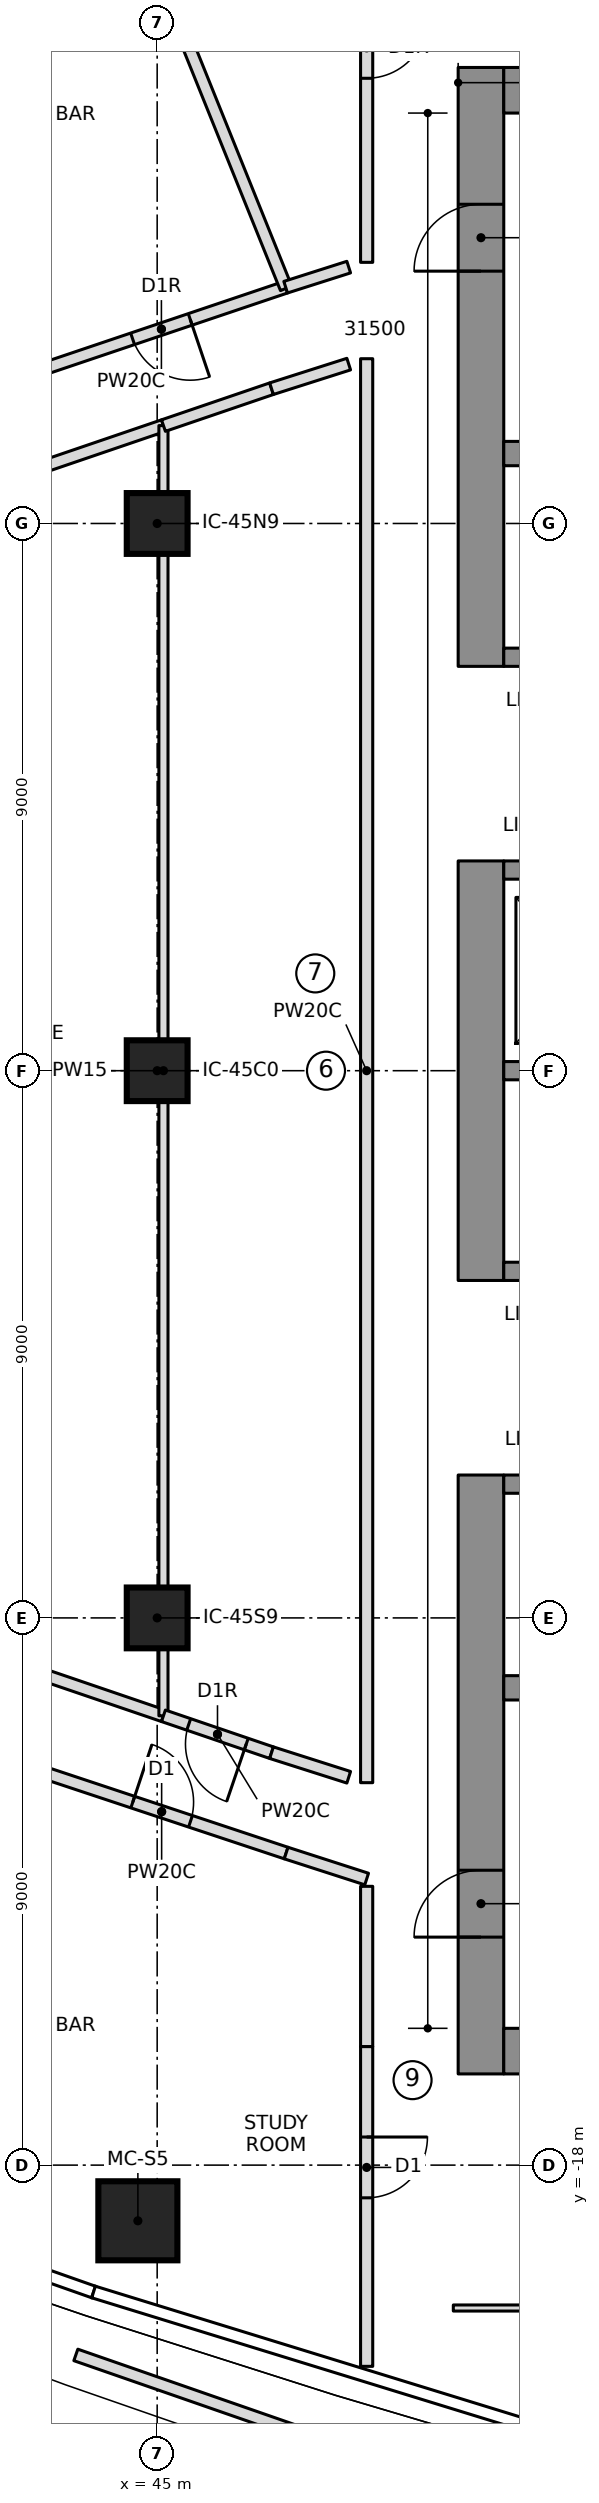
"""IFC4 building model, lengths in metres.
Left out: names, types, materials, properties, quantities, classifications, styles, units other than length and angle.
Written with IfcOpenShell. Run it as: python <this file> out.ifc"""

import sys

from ifc_helpers import new_model, si_unit, direction, frame, frame_2d, origin, origin_2d, place, context, subcontext, project, spatial, rectangle, extrude, element, fill, save


model = new_model("IFC4")
c1 = context("Model", 3, precision=1e-05, world=origin(), true_north=direction((0.0, 1.0)))
c2 = subcontext(c1, "Body", "Model", "MODEL_VIEW")
j1 = project(units=[si_unit("LENGTHUNIT", "METRE"), si_unit("PLANEANGLEUNIT", "RADIAN")], contexts=[c1])
p1 = place(None, origin())
s1 = spatial("IfcSite", under=j1, at=p1, CompositionType="ELEMENT")
p2 = place(p1, origin())
s2 = spatial("IfcBuilding", under=s1, at=p2, CompositionType="ELEMENT")
p3 = place(p2, frame((0.0, 0.0, 170.9)))
s3 = spatial("IfcBuildingStorey", under=s2, at=p3, CompositionType="ELEMENT", Elevation=170.9)
p4 = place(p3, frame((50.325, 6.65, 0.0), z_axis=(0.0, 0.0, 1.0), x_axis=(0.0, 1.0, 0.0)))
e1 = element("IfcWall", 1, at=p4, inside=s3, PredefinedType="SHEAR", context=c2, shape_type="SweptSolid", body=[
    extrude(rectangle(XDim=9.85, YDim=0.75, at=frame_2d((4.925, 0.0))), origin(), (0.0, 0.0, 1.0), 4.6),
])
p5 = place(p4, frame((6.5, 0.0, 0.0)))
e2 = element("IfcOpeningElement", 2, at=p5, cuts=e1, PredefinedType="OPENING", context=c2, shape_type="SweptSolid", body=[
    extrude(rectangle(XDim=1.1, YDim=2.1, at=frame_2d((0.55, 1.05))), frame((0.0, 0.385, 0.0), z_axis=(0.0, -1.0, 0.0), x_axis=(1.0, 0.0, 0.0)), (0.0, 0.0, 1.0), 0.77),
])
p6 = place(p3, frame((50.325, -3.45, 0.0), z_axis=(0.0, 0.0, 1.0), x_axis=(0.0, 1.0, 0.0)))
e3 = element("IfcWall", 3, at=p6, inside=s3, PredefinedType="SHEAR", context=c2, shape_type="SweptSolid", body=[
    extrude(rectangle(XDim=6.9, YDim=0.75, at=frame_2d((3.45, 0.0))), origin(), (0.0, 0.0, 1.0), 4.6),
])
p7 = place(p3, frame((50.325, -16.5, 0.0), z_axis=(0.0, 0.0, 1.0), x_axis=(0.0, 1.0, 0.0)))
e4 = element("IfcWall", 4, at=p7, inside=s3, PredefinedType="SHEAR", context=c2, shape_type="SweptSolid", body=[
    extrude(rectangle(XDim=9.85, YDim=0.75, at=frame_2d((4.925, 0.0))), origin(), (0.0, 0.0, 1.0), 4.6),
])
p8 = place(p7, frame((2.25, 0.0, 0.0)))
e5 = element("IfcOpeningElement", 5, at=p8, cuts=e4, PredefinedType="OPENING", context=c2, shape_type="SweptSolid", body=[
    extrude(rectangle(XDim=1.1, YDim=2.1, at=frame_2d((0.55, 1.05))), frame((0.0, 0.385, 0.0), z_axis=(0.0, -1.0, 0.0), x_axis=(1.0, 0.0, 0.0)), (0.0, 0.0, 1.0), 0.77),
])
for number, where, z_axis, x_axis in (
    (6, (50.7, 16.125, 0.0), (0.0, 0.0, 1.0), (1.0, 0.0, 0.0)),
    (7, (50.7, -16.125, 0.0), (0.0, 0.0, 1.0), (1.0, 0.0, 0.0)),
):
    element("IfcWall", number, at=place(p3, frame(where, z_axis=z_axis, x_axis=x_axis)), inside=s3, PredefinedType="SHEAR", context=c2, shape_type="SweptSolid", body=[
        extrude(rectangle(XDim=13.77, YDim=0.75, at=frame_2d((6.885, 0.0))), origin(), (0.0, 0.0, 1.0), 4.6),
    ])
p9 = place(p3, frame((50.7, 10.15, 0.0), z_axis=(0.0, 0.0, 1.0), x_axis=(1.0, 0.0, 0.0)))
e8 = element("IfcWall", 8, at=p9, inside=s3, PredefinedType="SHEAR", context=c2, shape_type="SweptSolid", body=[
    extrude(rectangle(XDim=13.02, YDim=0.4, at=frame_2d((6.51, 0.0))), origin(), (0.0, 0.0, 1.0), 4.6),
])
p10 = place(p9, frame((0.7, 0.0, 0.0)))
e9 = element("IfcOpeningElement", 9, at=p10, cuts=e8, PredefinedType="OPENING", context=c2, shape_type="SweptSolid", body=[
    extrude(rectangle(XDim=1.1, YDim=2.1, at=frame_2d((0.55, 1.05))), frame((0.0, 0.21, 0.0), z_axis=(0.0, -1.0, 0.0), x_axis=(1.0, 0.0, 0.0)), (0.0, 0.0, 1.0), 0.42),
])
p11 = place(p9, frame((3.5, 0.0, 0.0)))
e10 = element("IfcOpeningElement", 10, at=p11, cuts=e8, PredefinedType="OPENING", context=c2, shape_type="SweptSolid", body=[
    extrude(rectangle(XDim=1.1, YDim=2.1, at=frame_2d((0.55, 1.05))), frame((0.0, 0.21, 0.0), z_axis=(0.0, -1.0, 0.0), x_axis=(1.0, 0.0, 0.0)), (0.0, 0.0, 1.0), 0.42),
])
p12 = place(p3, frame((50.7, -10.15, 0.0), z_axis=(0.0, 0.0, 1.0), x_axis=(1.0, 0.0, 0.0)))
e11 = element("IfcWall", 11, at=p12, inside=s3, PredefinedType="SHEAR", context=c2, shape_type="SweptSolid", body=[
    extrude(rectangle(XDim=13.02, YDim=0.4, at=frame_2d((6.51, 0.0))), origin(), (0.0, 0.0, 1.0), 4.6),
])
p13 = place(p3, frame((50.7, 0.0, 0.0), z_axis=(0.0, 0.0, 1.0), x_axis=(1.0, 0.0, 0.0)))
e12 = element("IfcWall", 12, at=p13, inside=s3, PredefinedType="SHEAR", context=c2, shape_type="SweptSolid", body=[
    extrude(rectangle(XDim=10.9, YDim=0.3, at=frame_2d((5.45, 0.0))), origin(), (0.0, 0.0, 1.0), 4.6),
])
p14 = place(p3, frame((50.7, 3.3, 0.0), z_axis=(0.0, 0.0, 1.0), x_axis=(1.0, 0.0, 0.0)))
e13 = element("IfcWall", 13, at=p14, inside=s3, PredefinedType="SHEAR", context=c2, shape_type="SweptSolid", body=[
    extrude(rectangle(XDim=10.9, YDim=0.3, at=frame_2d((5.45, 0.0))), origin(), (0.0, 0.0, 1.0), 4.6),
])
p15 = place(p14, frame((0.7, 0.0, 0.0)))
e14 = element("IfcOpeningElement", 14, at=p15, cuts=e13, PredefinedType="OPENING", context=c2, shape_type="SweptSolid", body=[
    extrude(rectangle(XDim=1.1, YDim=2.1, at=frame_2d((0.55, 1.05))), frame((0.0, 0.16, 0.0), z_axis=(0.0, -1.0, 0.0), x_axis=(1.0, 0.0, 0.0)), (0.0, 0.0, 1.0), 0.32),
])
p16 = place(p14, frame((3.5, 0.0, 0.0)))
e15 = element("IfcOpeningElement", 15, at=p16, cuts=e13, PredefinedType="OPENING", context=c2, shape_type="SweptSolid", body=[
    extrude(rectangle(XDim=1.1, YDim=2.1, at=frame_2d((0.55, 1.05))), frame((0.0, 0.16, 0.0), z_axis=(0.0, -1.0, 0.0), x_axis=(1.0, 0.0, 0.0)), (0.0, 0.0, 1.0), 0.32),
])
p17 = place(p14, frame((6.3, 0.0, 0.0)))
e16 = element("IfcOpeningElement", 16, at=p17, cuts=e13, PredefinedType="OPENING", context=c2, shape_type="SweptSolid", body=[
    extrude(rectangle(XDim=1.1, YDim=2.1, at=frame_2d((0.55, 1.05))), frame((0.0, 0.16, 0.0), z_axis=(0.0, -1.0, 0.0), x_axis=(1.0, 0.0, 0.0)), (0.0, 0.0, 1.0), 0.32),
])
p18 = place(p14, frame((9.1, 0.0, 0.0)))
e17 = element("IfcOpeningElement", 17, at=p18, cuts=e13, PredefinedType="OPENING", context=c2, shape_type="SweptSolid", body=[
    extrude(rectangle(XDim=1.1, YDim=2.1, at=frame_2d((0.55, 1.05))), frame((0.0, 0.16, 0.0), z_axis=(0.0, -1.0, 0.0), x_axis=(1.0, 0.0, 0.0)), (0.0, 0.0, 1.0), 0.32),
])
p19 = place(p3, frame((50.7, 6.8, 0.0), z_axis=(0.0, 0.0, 1.0), x_axis=(1.0, 0.0, 0.0)))
e18 = element("IfcWall", 18, at=p19, inside=s3, PredefinedType="SHEAR", context=c2, shape_type="SweptSolid", body=[
    extrude(rectangle(XDim=10.9, YDim=0.3, at=frame_2d((5.45, 0.0))), origin(), (0.0, 0.0, 1.0), 4.6),
])
p20 = place(p19, frame((6.3, 0.0, 0.0)))
e19 = element("IfcOpeningElement", 19, at=p20, cuts=e18, PredefinedType="OPENING", context=c2, shape_type="SweptSolid", body=[
    extrude(rectangle(XDim=1.1, YDim=2.1, at=frame_2d((0.55, 1.05))), frame((0.0, 0.16, 0.0), z_axis=(0.0, -1.0, 0.0), x_axis=(1.0, 0.0, 0.0)), (0.0, 0.0, 1.0), 0.32),
])
p21 = place(p19, frame((9.1, 0.0, 0.0)))
e20 = element("IfcOpeningElement", 20, at=p21, cuts=e18, PredefinedType="OPENING", context=c2, shape_type="SweptSolid", body=[
    extrude(rectangle(XDim=1.1, YDim=2.1, at=frame_2d((0.55, 1.05))), frame((0.0, 0.16, 0.0), z_axis=(0.0, -1.0, 0.0), x_axis=(1.0, 0.0, 0.0)), (0.0, 0.0, 1.0), 0.32),
])
p22 = place(p3, frame((50.7, -3.3, 0.0), z_axis=(0.0, 0.0, 1.0), x_axis=(1.0, 0.0, 0.0)))
e21 = element("IfcWall", 21, at=p22, inside=s3, PredefinedType="SHEAR", context=c2, shape_type="SweptSolid", body=[
    extrude(rectangle(XDim=10.9, YDim=0.3, at=frame_2d((5.45, 0.0))), origin(), (0.0, 0.0, 1.0), 4.6),
])
p23 = place(p22, frame((9.1, 0.0, 0.0)))
e22 = element("IfcOpeningElement", 22, at=p23, cuts=e21, PredefinedType="OPENING", context=c2, shape_type="SweptSolid", body=[
    extrude(rectangle(XDim=1.1, YDim=2.1, at=frame_2d((0.55, 1.05))), frame((0.0, 0.16, 0.0), z_axis=(0.0, -1.0, 0.0), x_axis=(1.0, 0.0, 0.0)), (0.0, 0.0, 1.0), 0.32),
])
p24 = place(p3, frame((50.7, -6.8, 0.0), z_axis=(0.0, 0.0, 1.0), x_axis=(1.0, 0.0, 0.0)))
e23 = element("IfcWall", 23, at=p24, inside=s3, PredefinedType="SHEAR", context=c2, shape_type="SweptSolid", body=[
    extrude(rectangle(XDim=10.9, YDim=0.3, at=frame_2d((5.45, 0.0))), origin(), (0.0, 0.0, 1.0), 4.6),
])
p25 = place(p24, frame((0.7, 0.0, 0.0)))
e24 = element("IfcOpeningElement", 24, at=p25, cuts=e23, PredefinedType="OPENING", context=c2, shape_type="SweptSolid", body=[
    extrude(rectangle(XDim=1.1, YDim=2.1, at=frame_2d((0.55, 1.05))), frame((0.0, 0.16, 0.0), z_axis=(0.0, -1.0, 0.0), x_axis=(1.0, 0.0, 0.0)), (0.0, 0.0, 1.0), 0.32),
])
p26 = place(p24, frame((3.5, 0.0, 0.0)))
e25 = element("IfcOpeningElement", 25, at=p26, cuts=e23, PredefinedType="OPENING", context=c2, shape_type="SweptSolid", body=[
    extrude(rectangle(XDim=1.1, YDim=2.1, at=frame_2d((0.55, 1.05))), frame((0.0, 0.16, 0.0), z_axis=(0.0, -1.0, 0.0), x_axis=(1.0, 0.0, 0.0)), (0.0, 0.0, 1.0), 0.32),
])
p27 = place(p24, frame((6.3, 0.0, 0.0)))
e26 = element("IfcOpeningElement", 26, at=p27, cuts=e23, PredefinedType="OPENING", context=c2, shape_type="SweptSolid", body=[
    extrude(rectangle(XDim=1.1, YDim=2.1, at=frame_2d((0.55, 1.05))), frame((0.0, 0.16, 0.0), z_axis=(0.0, -1.0, 0.0), x_axis=(1.0, 0.0, 0.0)), (0.0, 0.0, 1.0), 0.32),
])
p28 = place(p24, frame((9.1, 0.0, 0.0)))
e27 = element("IfcOpeningElement", 27, at=p28, cuts=e23, PredefinedType="OPENING", context=c2, shape_type="SweptSolid", body=[
    extrude(rectangle(XDim=1.1, YDim=2.1, at=frame_2d((0.55, 1.05))), frame((0.0, 0.16, 0.0), z_axis=(0.0, -1.0, 0.0), x_axis=(1.0, 0.0, 0.0)), (0.0, 0.0, 1.0), 0.32),
])
p29 = place(p3, frame((44.683, -18.916, 0.0), z_axis=(0.0, 0.0, 1.0), x_axis=(1.0, 0.0, 0.0)))
e28 = element("IfcColumn", 28, at=p29, inside=s3, PredefinedType="COLUMN", context=c2, shape_type="SweptSolid", body=[
    extrude(rectangle(XDim=1.3, YDim=1.3, at=origin_2d()), origin(), (0.0, 0.0, 1.0), 4.6),
])
for number, where, z_axis, x_axis in (
    (29, (45.0, -9.0, 0.0), (0.0, 0.0, 1.0), (1.0, 0.0, 0.0)),
    (30, (45.0, 0.0, 0.0), (0.0, 0.0, 1.0), (1.0, 0.0, 0.0)),
    (31, (45.0, 9.0, 0.0), (0.0, 0.0, 1.0), (1.0, 0.0, 0.0)),
):
    element("IfcColumn", number, at=place(p3, frame(where, z_axis=z_axis, x_axis=x_axis)), inside=s3, PredefinedType="COLUMN", context=c2, shape_type="SweptSolid", body=[
        extrude(rectangle(XDim=1.0, YDim=1.0, at=origin_2d()), origin(), (0.0, 0.0, 1.0), 4.6),
    ])
p30 = place(p3, frame((43.662, -21.122, 0.0), z_axis=(0.0, 0.0, 1.0), x_axis=(0.944536635865, -0.328406064969, 0.0)))
e32 = element("IfcWall", 32, at=p30, inside=s3, PredefinedType="PARAPET", context=c2, shape_type="SweptSolid", body=[
    extrude(rectangle(XDim=4.381, YDim=0.2, at=frame_2d((2.19, 0.0))), origin(), (0.0, 0.0, 1.0), 1.1),
])
p31 = place(p3, frame((47.113, 12.886, 0.0), z_axis=(0.0, 0.0, 1.0), x_axis=(-0.947550995841, -0.319604615549, 0.0)))
e33 = element("IfcWall", 33, at=p31, inside=s3, PredefinedType="PARTITIONING", context=c2, shape_type="SweptSolid", body=[
    extrude(rectangle(XDim=4.314, YDim=0.2, at=frame_2d((2.157, 0.0))), origin(), (0.0, 0.0, 1.0), 4.3),
])
p32 = place(p31, frame((1.657, 0.0, 0.0)))
e34 = element("IfcOpeningElement", 34, at=p32, cuts=e33, PredefinedType="OPENING", context=c2, shape_type="SweptSolid", body=[
    extrude(rectangle(XDim=1.0, YDim=2.1, at=frame_2d((0.5, 1.05))), frame((0.0, 0.11, 0.0), z_axis=(0.0, -1.0, 0.0), x_axis=(1.0, 0.0, 0.0)), (0.0, 0.0, 1.0), 0.22),
])
p33 = place(p3, frame((47.121, 12.867, 0.0), z_axis=(0.0, 0.0, 1.0), x_axis=(-0.373907892596, 0.92746584188, 0.0)))
e35 = element("IfcWall", 35, at=p33, inside=s3, PredefinedType="PARTITIONING", context=c2, shape_type="SweptSolid", body=[
    extrude(rectangle(XDim=7.621, YDim=0.2, at=frame_2d((3.811, 0.0))), origin(), (0.0, 0.0, 1.0), 4.3),
])
p34 = place(p3, frame((43.026, -11.507, 0.0), z_axis=(0.0, 0.0, 1.0), x_axis=(0.949022233489, -0.315209137469, 0.0)))
e36 = element("IfcWall", 36, at=p34, inside=s3, PredefinedType="PARTITIONING", context=c2, shape_type="SweptSolid", body=[
    extrude(rectangle(XDim=4.315, YDim=0.2, at=frame_2d((2.157, 0.0))), origin(), (0.0, 0.0, 1.0), 4.3),
])
p35 = place(p34, frame((1.657, 0.0, 0.0)))
e37 = element("IfcOpeningElement", 37, at=p35, cuts=e36, PredefinedType="OPENING", context=c2, shape_type="SweptSolid", body=[
    extrude(rectangle(XDim=1.0, YDim=2.1, at=frame_2d((0.5, 1.05))), frame((0.0, 0.11, 0.0), z_axis=(0.0, -1.0, 0.0), x_axis=(1.0, 0.0, 0.0)), (0.0, 0.0, 1.0), 0.22),
])
for number, where, z_axis, x_axis in (
    (38, (42.984, 9.887, 0.0), (0.0, 0.0, 1.0), (0.946, 0.323, 0.0)),
    (39, (45.103, -10.61, 0.0), (0.0, 0.0, 1.0), (-0.946, 0.323, 0.0)),
):
    element("IfcWall", number, at=place(p3, frame(where, z_axis=z_axis, x_axis=x_axis)), inside=s3, PredefinedType="PARTITIONING", context=c2, shape_type="SweptSolid", body=[
        extrude(rectangle(XDim=2.239, YDim=0.2, at=frame_2d((1.119, 0.0))), origin(), (0.0, 0.0, 1.0), 4.3),
    ])
p36 = place(p3, frame((45.103, -10.61, 0.0), z_axis=(0.0, 0.0, 1.0), x_axis=(0.0, 1.0, 0.0)))
e40 = element("IfcWall", 40, at=p36, inside=s3, PredefinedType="PARTITIONING", context=c2, shape_type="SweptSolid", body=[
    extrude(rectangle(XDim=21.22, YDim=0.15, at=frame_2d((10.61, 0.0))), origin(), (0.0, 0.0, 1.0), 4.3),
])
p37 = place(p3, frame((46.881, -11.217, 0.0), z_axis=(0.0, 0.0, 1.0), x_axis=(-0.946437079914, 0.322888299204, 0.0)))
e41 = element("IfcWall", 41, at=p37, inside=s3, PredefinedType="PARTITIONING", context=c2, shape_type="SweptSolid", body=[
    extrude(rectangle(XDim=1.878, YDim=0.2, at=frame_2d((0.939, 0.0))), origin(), (0.0, 0.0, 1.0), 4.3),
])
p38 = place(p37, frame((0.439, 0.0, 0.0)))
e42 = element("IfcOpeningElement", 42, at=p38, cuts=e41, PredefinedType="OPENING", context=c2, shape_type="SweptSolid", body=[
    extrude(rectangle(XDim=1.0, YDim=2.1, at=frame_2d((0.5, 1.05))), frame((0.0, 0.11, 0.0), z_axis=(0.0, -1.0, 0.0), x_axis=(1.0, 0.0, 0.0)), (0.0, 0.0, 1.0), 0.22),
])
p39 = place(p3, frame((45.103, 10.61, 0.0), z_axis=(0.0, 0.0, 1.0), x_axis=(0.946437079914, 0.322888299204, 0.0)))
e43 = element("IfcWall", 43, at=p39, inside=s3, PredefinedType="PARTITIONING", context=c2, shape_type="SweptSolid", body=[
    extrude(rectangle(XDim=1.878, YDim=0.2, at=frame_2d((0.939, 0.0))), origin(), (0.0, 0.0, 1.0), 4.3),
])
p40 = place(p3, frame((48.15, 13.217, 0.0), z_axis=(0.0, 0.0, 1.0), x_axis=(-0.952731090451, -0.303814860215, 0.0)))
e44 = element("IfcWall", 44, at=p40, inside=s3, PredefinedType="PARTITIONING", context=c2, shape_type="SweptSolid", body=[
    extrude(rectangle(XDim=1.088, YDim=0.2, at=frame_2d((0.544, 0.0))), origin(), (0.0, 0.0, 1.0), 4.3),
])
for number, where, z_axis, x_axis in (
    (45, (46.881, 11.217, 0.0), (0.0, 0.0, 1.0), (0.953, 0.304, 0.0)),
    (46, (48.15, -11.621, 0.0), (0.0, 0.0, 1.0), (-0.953, 0.304, 0.0)),
):
    element("IfcWall", number, at=place(p3, frame(where, z_axis=z_axis, x_axis=x_axis)), inside=s3, PredefinedType="PARTITIONING", context=c2, shape_type="SweptSolid", body=[
        extrude(rectangle(XDim=1.332, YDim=0.2, at=frame_2d((0.666, 0.0))), origin(), (0.0, 0.0, 1.0), 4.3),
    ])
p41 = place(p3, frame((48.445, -16.05, 0.0), z_axis=(0.0, 0.0, 1.0), x_axis=(0.0, -1.0, 0.0)))
e47 = element("IfcWall", 47, at=p41, inside=s3, PredefinedType="PARTITIONING", context=c2, shape_type="SweptSolid", body=[
    extrude(rectangle(XDim=5.26, YDim=0.2, at=frame_2d((2.63, 0.0))), origin(), (0.0, 0.0, 1.0), 4.3),
])
p42 = place(p41, frame((1.488, 0.0, 0.0)))
e48 = element("IfcOpeningElement", 48, at=p42, cuts=e47, PredefinedType="OPENING", context=c2, shape_type="SweptSolid", body=[
    extrude(rectangle(XDim=1.0, YDim=2.1, at=frame_2d((0.5, 1.05))), frame((0.0, 0.11, 0.0), z_axis=(0.0, -1.0, 0.0), x_axis=(1.0, 0.0, 0.0)), (0.0, 0.0, 1.0), 0.22),
])
p43 = place(p3, frame((48.445, 11.71, 0.0), z_axis=(0.0, 0.0, 1.0), x_axis=(0.0, -1.0, 0.0)))
e49 = element("IfcWall", 49, at=p43, inside=s3, PredefinedType="PARTITIONING", context=c2, shape_type="SweptSolid", body=[
    extrude(rectangle(XDim=23.42, YDim=0.2, at=frame_2d((11.71, 0.0))), origin(), (0.0, 0.0, 1.0), 4.3),
])
p44 = place(p3, frame((48.445, 20.35, 0.0), z_axis=(0.0, 0.0, 1.0), x_axis=(0.0, -1.0, 0.0)))
e50 = element("IfcWall", 50, at=p44, inside=s3, PredefinedType="PARTITIONING", context=c2, shape_type="SweptSolid", body=[
    extrude(rectangle(XDim=7.055, YDim=0.2, at=frame_2d((3.528, 0.0))), origin(), (0.0, 0.0, 1.0), 4.3),
])
p45 = place(p44, frame((3.028, 0.0, 0.0)))
e51 = element("IfcOpeningElement", 51, at=p45, cuts=e50, PredefinedType="OPENING", context=c2, shape_type="SweptSolid", body=[
    extrude(rectangle(XDim=1.0, YDim=2.1, at=frame_2d((0.5, 1.05))), frame((0.0, 0.11, 0.0), z_axis=(0.0, -1.0, 0.0), x_axis=(1.0, 0.0, 0.0)), (0.0, 0.0, 1.0), 0.22),
])
p46 = place(p3, frame((47.121, -12.867, 0.0), z_axis=(0.0, 0.0, 1.0), x_axis=(0.951640795778, -0.307212948637, 0.0)))
e52 = element("IfcWall", 52, at=p46, inside=s3, PredefinedType="PARTITIONING", context=c2, shape_type="SweptSolid", body=[
    extrude(rectangle(XDim=1.392, YDim=0.2, at=frame_2d((0.696, 0.0))), origin(), (0.0, 0.0, 1.0), 4.3),
])
p47 = place(p3, frame((48.445, -13.415, 0.0), z_axis=(0.0, 0.0, 1.0), x_axis=(0.0, -1.0, 0.0)))
e53 = element("IfcWall", 53, at=p47, inside=s3, PredefinedType="PARTITIONING", context=c2, shape_type="SweptSolid", body=[
    extrude(rectangle(XDim=2.635, YDim=0.2, at=frame_2d((1.317, 0.0))), origin(), (0.0, 0.0, 1.0), 4.3),
])
p48 = place(p3, frame((53.75, -20.35, 0.0), z_axis=(0.0, 0.0, 1.0), x_axis=(-1.0, 0.0, 0.0)))
e54 = element("IfcWall", 54, at=p48, inside=s3, PredefinedType="PARTITIONING", context=c2, shape_type="SweptSolid", body=[
    extrude(rectangle(XDim=3.88, YDim=0.1, at=frame_2d((1.94, 0.0))), origin(), (0.0, 0.0, 1.0), 4.3),
])
p49 = place(p32, origin())
e55 = element("IfcDoor", 55, at=p49, inside=s3, OperationType="SINGLE_SWING_RIGHT", PredefinedType="DOOR", context=c2, shape_type="SweptSolid", body=[
    extrude(rectangle(XDim=1.0, YDim=2.1, at=frame_2d((0.5, 1.05))), frame((0.0, 0.025, 0.0), z_axis=(0.0, -1.0, 0.0), x_axis=(1.0, 0.0, 0.0)), (0.0, 0.0, 1.0), 0.05),
])
fill(e34, e55)
p50 = place(p35, origin())
e56 = element("IfcDoor", 56, at=p50, inside=s3, OperationType="SINGLE_SWING_LEFT", PredefinedType="DOOR", context=c2, shape_type="SweptSolid", body=[
    extrude(rectangle(XDim=1.0, YDim=2.1, at=frame_2d((0.5, 1.05))), frame((0.0, 0.025, 0.0), z_axis=(0.0, -1.0, 0.0), x_axis=(1.0, 0.0, 0.0)), (0.0, 0.0, 1.0), 0.05),
])
fill(e37, e56)
p51 = place(p38, origin())
e57 = element("IfcDoor", 57, at=p51, inside=s3, OperationType="SINGLE_SWING_RIGHT", PredefinedType="DOOR", context=c2, shape_type="SweptSolid", body=[
    extrude(rectangle(XDim=1.0, YDim=2.1, at=frame_2d((0.5, 1.05))), frame((0.0, 0.025, 0.0), z_axis=(0.0, -1.0, 0.0), x_axis=(1.0, 0.0, 0.0)), (0.0, 0.0, 1.0), 0.05),
])
fill(e42, e57)
p52 = place(p42, origin())
e58 = element("IfcDoor", 58, at=p52, inside=s3, OperationType="SINGLE_SWING_LEFT", PredefinedType="DOOR", context=c2, shape_type="SweptSolid", body=[
    extrude(rectangle(XDim=1.0, YDim=2.1, at=frame_2d((0.5, 1.05))), frame((0.0, 0.025, 0.0), z_axis=(0.0, -1.0, 0.0), x_axis=(1.0, 0.0, 0.0)), (0.0, 0.0, 1.0), 0.05),
])
fill(e48, e58)
p53 = place(p45, origin())
e59 = element("IfcDoor", 59, at=p53, inside=s3, OperationType="SINGLE_SWING_RIGHT", PredefinedType="DOOR", context=c2, shape_type="SweptSolid", body=[
    extrude(rectangle(XDim=1.0, YDim=2.1, at=frame_2d((0.5, 1.05))), frame((0.0, 0.025, 0.0), z_axis=(0.0, -1.0, 0.0), x_axis=(1.0, 0.0, 0.0)), (0.0, 0.0, 1.0), 0.05),
])
fill(e51, e59)
p54 = place(p5, origin())
e60 = element("IfcDoor", 60, at=p54, inside=s3, OperationType="SINGLE_SWING_RIGHT", PredefinedType="DOOR", context=c2, shape_type="SweptSolid", body=[
    extrude(rectangle(XDim=1.1, YDim=2.1, at=frame_2d((0.55, 1.05))), frame((0.0, 0.025, 0.0), z_axis=(0.0, -1.0, 0.0), x_axis=(1.0, 0.0, 0.0)), (0.0, 0.0, 1.0), 0.05),
])
fill(e2, e60)
p55 = place(p8, origin())
e61 = element("IfcDoor", 61, at=p55, inside=s3, OperationType="SINGLE_SWING_RIGHT", PredefinedType="DOOR", context=c2, shape_type="SweptSolid", body=[
    extrude(rectangle(XDim=1.1, YDim=2.1, at=frame_2d((0.55, 1.05))), frame((0.0, 0.025, 0.0), z_axis=(0.0, -1.0, 0.0), x_axis=(1.0, 0.0, 0.0)), (0.0, 0.0, 1.0), 0.05),
])
fill(e5, e61)
save(model, sys.argv[1])
